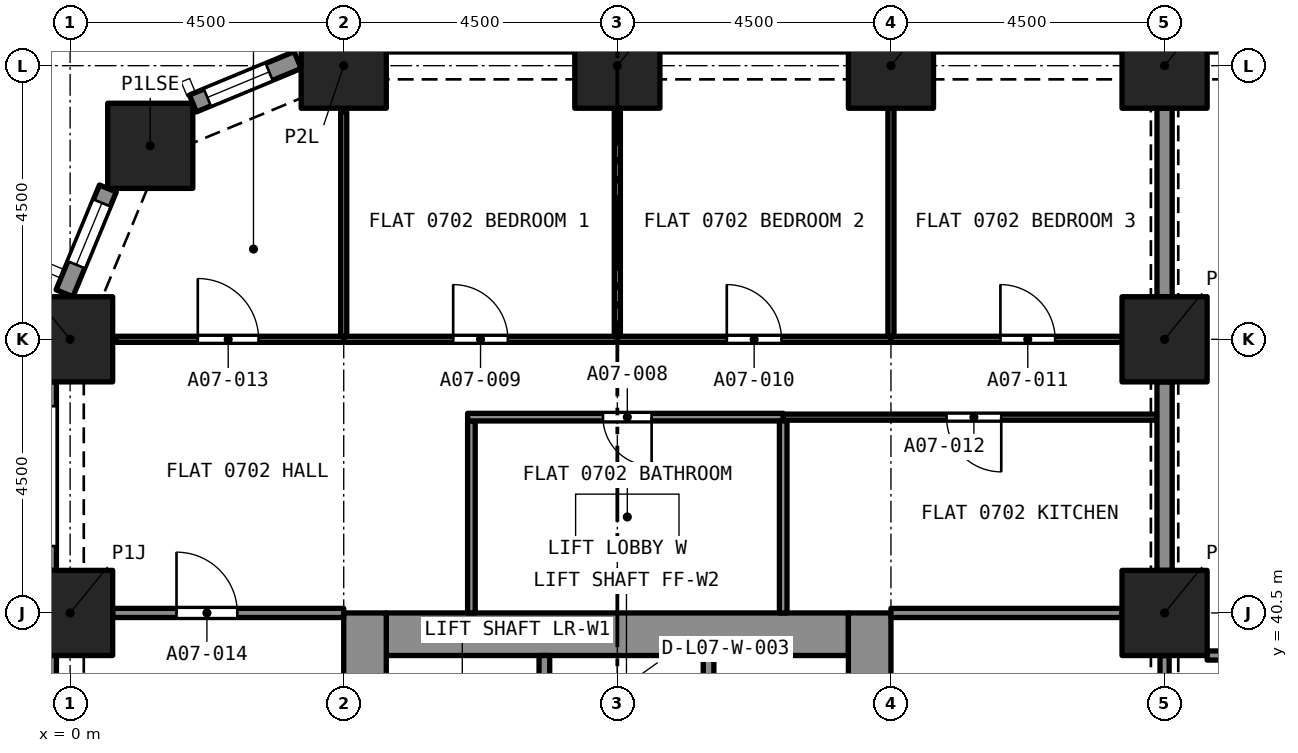
"""IFC4 building model, lengths in metres.
Left out: names, types, materials, properties, quantities, classifications, styles, units other than length and angle.
Written with IfcOpenShell. Run it as: python <this file> out.ifc"""

import sys

from ifc_helpers import new_model, si_unit, direction, frame, frame_2d, origin, origin_2d, place, context, subcontext, project, spatial, rectangle, extrude, element, fill, save


model = new_model("IFC4")
c1 = context("Model", 3, precision=1e-05, world=origin(), true_north=direction((0.0, 1.0)))
c2 = subcontext(c1, "Body", "Model", "MODEL_VIEW")
j1 = project(units=[si_unit("LENGTHUNIT", "METRE"), si_unit("PLANEANGLEUNIT", "RADIAN")], contexts=[c1])
p1 = place(None, origin())
s1 = spatial("IfcSite", under=j1, at=p1, CompositionType="ELEMENT")
p2 = place(p1, origin())
s2 = spatial("IfcBuilding", under=s1, at=p2, CompositionType="ELEMENT")
p3 = place(p2, frame((0.0, 0.0, 33.6)))
s3 = spatial("IfcBuildingStorey", under=s2, at=p3, CompositionType="ELEMENT", Elevation=33.6)
for number, where, z_axis, x_axis in (
    (1, (0.0, 40.5, 0.0), (0.0, 0.0, 1.0), (1.0, 0.0, 0.0)),
    (2, (18.0, 40.5, 0.0), (0.0, 0.0, 1.0), (1.0, 0.0, 0.0)),
    (3, (0.0, 45.0, 0.0), (0.0, 0.0, 1.0), (1.0, 0.0, 0.0)),
    (4, (18.0, 45.0, 0.0), (0.0, 0.0, 1.0), (1.0, 0.0, 0.0)),
    (5, (1.318, 48.182, 0.0), (0.0, 0.0, 1.0), (1.0, 0.0, 0.0)),
    (6, (4.5, 49.5, 0.0), (0.0, 0.0, 1.0), (1.0, 0.0, 0.0)),
    (7, (9.0, 49.5, 0.0), (0.0, 0.0, 1.0), (1.0, 0.0, 0.0)),
    (8, (13.5, 49.5, 0.0), (0.0, 0.0, 1.0), (1.0, 0.0, 0.0)),
    (9, (18.0, 49.5, 0.0), (0.0, 0.0, 1.0), (1.0, 0.0, 0.0)),
):
    element("IfcColumn", number, at=place(p3, frame(where, z_axis=z_axis, x_axis=x_axis)), inside=s3, PredefinedType="COLUMN", context=c2, shape_type="SweptSolid", body=[
        extrude(rectangle(XDim=1.4, YDim=1.4, at=origin_2d()), origin(), (0.0, 0.0, 1.0), 3.2),
    ])
p4 = place(p3, frame((5.2, 40.15, 0.0), z_axis=(0.0, 0.0, 1.0), x_axis=(1.0, 0.0, 0.0)))
e10 = element("IfcWall", 10, at=p4, inside=s3, PredefinedType="SOLIDWALL", context=c2, shape_type="SweptSolid", body=[
    extrude(rectangle(XDim=7.6, YDim=0.7, at=frame_2d((3.8, 0.0))), origin(), (0.0, 0.0, 1.0), 3.2),
])
p5 = place(p3, frame((4.85, 27.0, 0.0), z_axis=(0.0, 0.0, 1.0), x_axis=(0.0, 1.0, 0.0)))
e11 = element("IfcWall", 11, at=p5, inside=s3, PredefinedType="SOLIDWALL", context=c2, shape_type="SweptSolid", body=[
    extrude(rectangle(XDim=13.5, YDim=0.7, at=frame_2d((6.75, 0.0))), origin(), (0.0, 0.0, 1.0), 3.2),
])
p6 = place(p5, frame((8.95, 0.0, 0.0)))
e12 = element("IfcOpeningElement", 12, at=p6, cuts=e11, PredefinedType="OPENING", context=c2, shape_type="SweptSolid", body=[
    extrude(rectangle(XDim=1.2, YDim=2.1, at=frame_2d((0.6, 1.05))), frame((0.0, 0.36, 0.0), z_axis=(0.0, -1.0, 0.0), x_axis=(1.0, 0.0, 0.0)), (0.0, 0.0, 1.0), 0.72),
])
p7 = place(p3, frame((13.15, 27.0, 0.0), z_axis=(0.0, 0.0, 1.0), x_axis=(0.0, 1.0, 0.0)))
e13 = element("IfcWall", 13, at=p7, inside=s3, PredefinedType="SOLIDWALL", context=c2, shape_type="SweptSolid", body=[
    extrude(rectangle(XDim=13.5, YDim=0.7, at=frame_2d((6.75, 0.0))), origin(), (0.0, 0.0, 1.0), 3.2),
])
p8 = place(p7, frame((11.1, 0.0, 0.0)))
e14 = element("IfcOpeningElement", 14, at=p8, cuts=e13, PredefinedType="OPENING", context=c2, shape_type="SweptSolid", body=[
    extrude(rectangle(XDim=1.1, YDim=2.1, at=frame_2d((0.55, 1.05))), frame((0.0, 0.36, 0.0), z_axis=(0.0, -1.0, 0.0), x_axis=(1.0, 0.0, 0.0)), (0.0, 0.0, 1.0), 0.72),
])
p9 = place(p7, frame((8.95, 0.0, 0.0)))
e15 = element("IfcOpeningElement", 15, at=p9, cuts=e13, PredefinedType="OPENING", context=c2, shape_type="SweptSolid", body=[
    extrude(rectangle(XDim=1.2, YDim=2.1, at=frame_2d((0.6, 1.05))), frame((0.0, 0.36, 0.0), z_axis=(0.0, -1.0, 0.0), x_axis=(1.0, 0.0, 0.0)), (0.0, 0.0, 1.0), 0.72),
])
p10 = place(p3, frame((2.02, 48.878, 0.0), z_axis=(0.0, 0.0, 1.0), x_axis=(0.923903565336, 0.38262540684, 0.0)))
e16 = element("IfcWall", 16, at=p10, inside=s3, PredefinedType="SOLIDWALL", context=c2, shape_type="SweptSolid", body=[
    extrude(rectangle(XDim=1.865, YDim=0.3, at=frame_2d((0.933, 0.0))), origin(), (0.0, 0.0, 1.0), 3.2),
])
p11 = place(p10, frame((0.258, 0.0, 0.45)))
e17 = element("IfcOpeningElement", 17, at=p11, cuts=e16, PredefinedType="OPENING", context=c2, shape_type="SweptSolid", body=[
    extrude(rectangle(XDim=1.1, YDim=1.95, at=frame_2d((0.55, 0.975))), frame((0.0, 0.16, 0.0), z_axis=(0.0, -1.0, 0.0), x_axis=(1.0, 0.0, 0.0)), (0.0, 0.0, 1.0), 0.32),
])
p12 = place(p3, frame((-0.092, 45.757, 0.0), z_axis=(0.0, 0.0, 1.0), x_axis=(0.382737135771, 0.923857286003, 0.0)))
e18 = element("IfcWall", 18, at=p12, inside=s3, PredefinedType="SOLIDWALL", context=c2, shape_type="SweptSolid", body=[
    extrude(rectangle(XDim=1.865, YDim=0.3, at=frame_2d((0.933, 0.0))), origin(), (0.0, 0.0, 1.0), 3.2),
])
p13 = place(p12, frame((0.508, 0.0, 0.45)))
e19 = element("IfcOpeningElement", 19, at=p13, cuts=e18, PredefinedType="OPENING", context=c2, shape_type="SweptSolid", body=[
    extrude(rectangle(XDim=1.1, YDim=1.95, at=frame_2d((0.55, 0.975))), frame((0.0, 0.16, 0.0), z_axis=(0.0, -1.0, 0.0), x_axis=(1.0, 0.0, 0.0)), (0.0, 0.0, 1.0), 0.32),
])
p14 = place(p3, frame((-0.375, 41.2, 0.0), z_axis=(0.0, 0.0, 1.0), x_axis=(0.0, 1.0, 0.0)))
e20 = element("IfcWall", 20, at=p14, inside=s3, PredefinedType="SOLIDWALL", context=c2, shape_type="SweptSolid", body=[
    extrude(rectangle(XDim=3.1, YDim=0.3, at=frame_2d((1.55, 0.0))), origin(), (0.0, 0.0, 1.0), 3.2),
])
p15 = place(p14, frame((0.4, 0.0, 0.45)))
e21 = element("IfcOpeningElement", 21, at=p15, cuts=e20, PredefinedType="OPENING", context=c2, shape_type="SweptSolid", body=[
    extrude(rectangle(XDim=2.3, YDim=1.95, at=frame_2d((1.15, 0.975))), frame((0.0, 0.16, 0.0), z_axis=(0.0, -1.0, 0.0), x_axis=(1.0, 0.0, 0.0)), (0.0, 0.0, 1.0), 0.32),
])
p16 = place(p3, frame((-0.375, 36.7, 0.0), z_axis=(0.0, 0.0, 1.0), x_axis=(0.0, 1.0, 0.0)))
e22 = element("IfcWall", 22, at=p16, inside=s3, PredefinedType="SOLIDWALL", context=c2, shape_type="SweptSolid", body=[
    extrude(rectangle(XDim=3.1, YDim=0.3, at=frame_2d((1.55, 0.0))), origin(), (0.0, 0.0, 1.0), 3.2),
])
p17 = place(p16, frame((0.4, 0.0, 0.45)))
e23 = element("IfcOpeningElement", 23, at=p17, cuts=e22, PredefinedType="OPENING", context=c2, shape_type="SweptSolid", body=[
    extrude(rectangle(XDim=2.3, YDim=1.95, at=frame_2d((1.15, 0.975))), frame((0.0, 0.16, 0.0), z_axis=(0.0, -1.0, 0.0), x_axis=(1.0, 0.0, 0.0)), (0.0, 0.0, 1.0), 0.32),
])
p18 = place(p3, frame((6.6, 40.5, 0.0), z_axis=(0.0, 0.0, 1.0), x_axis=(0.0, 1.0, 0.0)))
e24 = element("IfcWall", 24, at=p18, inside=s3, PredefinedType="PARTITIONING", context=c2, shape_type="SweptSolid", body=[
    extrude(rectangle(XDim=3.157, YDim=0.125, at=frame_2d((1.579, 0.0))), origin(), (0.0, 0.0, 1.0), 2.9),
])
p19 = place(p3, frame((11.728, 43.72, 0.0), z_axis=(0.0, 0.0, 1.0), x_axis=(-1.0, 0.0, 0.0)))
e25 = element("IfcWall", 25, at=p19, inside=s3, PredefinedType="PARTITIONING", context=c2, shape_type="SweptSolid", body=[
    extrude(rectangle(XDim=5.19, YDim=0.125, at=frame_2d((2.595, 0.0))), origin(), (0.0, 0.0, 1.0), 2.9),
])
p20 = place(p19, frame((2.164, 0.0, 0.0)))
e26 = element("IfcOpeningElement", 26, at=p20, cuts=e25, PredefinedType="OPENING", context=c2, shape_type="SweptSolid", body=[
    extrude(rectangle(XDim=0.8, YDim=2.1, at=frame_2d((0.4, 1.05))), frame((0.0, 0.073, 0.0), z_axis=(0.0, -1.0, 0.0), x_axis=(1.0, 0.0, 0.0)), (0.0, 0.0, 1.0), 0.145),
])
p21 = place(p3, frame((11.728, 40.5, 0.0), z_axis=(0.0, 0.0, 1.0), x_axis=(0.0, 1.0, 0.0)))
e27 = element("IfcWall", 27, at=p21, inside=s3, PredefinedType="PARTITIONING", context=c2, shape_type="SweptSolid", body=[
    extrude(rectangle(XDim=3.157, YDim=0.125, at=frame_2d((1.579, 0.0))), origin(), (0.0, 0.0, 1.0), 2.9),
])
p22 = place(p3, frame((9.0, 45.05, 0.0), z_axis=(0.0, 0.0, 1.0), x_axis=(0.0, 1.0, 0.0)))
e28 = element("IfcWall", 28, at=p22, inside=s3, PredefinedType="PARTITIONING", context=c2, shape_type="SweptSolid", body=[
    extrude(rectangle(XDim=3.75, YDim=0.1, at=frame_2d((1.875, 0.0))), origin(), (0.0, 0.0, 1.0), 2.9),
])
p23 = place(p3, frame((4.5, 45.0, 0.0), z_axis=(0.0, 0.0, 1.0), x_axis=(1.0, 0.0, 0.0)))
e29 = element("IfcWall", 29, at=p23, inside=s3, PredefinedType="PARTITIONING", context=c2, shape_type="SweptSolid", body=[
    extrude(rectangle(XDim=4.5, YDim=0.1, at=frame_2d((2.25, 0.0))), origin(), (0.0, 0.0, 1.0), 2.9),
])
p24 = place(p23, frame((1.8, 0.0, 0.0)))
e30 = element("IfcOpeningElement", 30, at=p24, cuts=e29, PredefinedType="OPENING", context=c2, shape_type="SweptSolid", body=[
    extrude(rectangle(XDim=0.9, YDim=2.1, at=frame_2d((0.45, 1.05))), frame((0.0, 0.06, 0.0), z_axis=(0.0, -1.0, 0.0), x_axis=(1.0, 0.0, 0.0)), (0.0, 0.0, 1.0), 0.12),
])
p25 = place(p3, frame((4.5, 45.05, 0.0), z_axis=(0.0, 0.0, 1.0), x_axis=(0.0, 1.0, 0.0)))
e31 = element("IfcWall", 31, at=p25, inside=s3, PredefinedType="PARTITIONING", context=c2, shape_type="SweptSolid", body=[
    extrude(rectangle(XDim=3.692, YDim=0.1, at=frame_2d((1.846, 0.0))), origin(), (0.0, 0.0, 1.0), 2.9),
])
p26 = place(p3, frame((13.5, 45.05, 0.0), z_axis=(0.0, 0.0, 1.0), x_axis=(0.0, 1.0, 0.0)))
e32 = element("IfcWall", 32, at=p26, inside=s3, PredefinedType="PARTITIONING", context=c2, shape_type="SweptSolid", body=[
    extrude(rectangle(XDim=3.75, YDim=0.1, at=frame_2d((1.875, 0.0))), origin(), (0.0, 0.0, 1.0), 2.9),
])
p27 = place(p3, frame((9.0, 45.0, 0.0), z_axis=(0.0, 0.0, 1.0), x_axis=(1.0, 0.0, 0.0)))
e33 = element("IfcWall", 33, at=p27, inside=s3, PredefinedType="PARTITIONING", context=c2, shape_type="SweptSolid", body=[
    extrude(rectangle(XDim=4.5, YDim=0.1, at=frame_2d((2.25, 0.0))), origin(), (0.0, 0.0, 1.0), 2.9),
])
p28 = place(p27, frame((1.8, 0.0, 0.0)))
e34 = element("IfcOpeningElement", 34, at=p28, cuts=e33, PredefinedType="OPENING", context=c2, shape_type="SweptSolid", body=[
    extrude(rectangle(XDim=0.9, YDim=2.1, at=frame_2d((0.45, 1.05))), frame((0.0, 0.06, 0.0), z_axis=(0.0, -1.0, 0.0), x_axis=(1.0, 0.0, 0.0)), (0.0, 0.0, 1.0), 0.12),
])
p29 = place(p3, frame((13.5, 45.0, 0.0), z_axis=(0.0, 0.0, 1.0), x_axis=(1.0, 0.0, 0.0)))
e35 = element("IfcWall", 35, at=p29, inside=s3, PredefinedType="PARTITIONING", context=c2, shape_type="SweptSolid", body=[
    extrude(rectangle(XDim=3.8, YDim=0.1, at=frame_2d((1.9, 0.0))), origin(), (0.0, 0.0, 1.0), 2.9),
])
p30 = place(p29, frame((1.8, 0.0, 0.0)))
e36 = element("IfcOpeningElement", 36, at=p30, cuts=e35, PredefinedType="OPENING", context=c2, shape_type="SweptSolid", body=[
    extrude(rectangle(XDim=0.9, YDim=2.1, at=frame_2d((0.45, 1.05))), frame((0.0, 0.06, 0.0), z_axis=(0.0, -1.0, 0.0), x_axis=(1.0, 0.0, 0.0)), (0.0, 0.0, 1.0), 0.12),
])
p31 = place(p3, frame((18.0, 45.7, 0.0), z_axis=(0.0, 0.0, 1.0), x_axis=(0.0, 1.0, 0.0)))
e37 = element("IfcWall", 37, at=p31, inside=s3, PredefinedType="PARTITIONING", context=c2, shape_type="SweptSolid", body=[
    extrude(rectangle(XDim=3.1, YDim=0.25, at=frame_2d((1.55, 0.0))), origin(), (0.0, 0.0, 1.0), 2.38),
])
p32 = place(p3, frame((17.875, 43.72, 0.0), z_axis=(0.0, 0.0, 1.0), x_axis=(-1.0, 0.0, 0.0)))
e38 = element("IfcWall", 38, at=p32, inside=s3, PredefinedType="PARTITIONING", context=c2, shape_type="SweptSolid", body=[
    extrude(rectangle(XDim=6.147, YDim=0.1, at=frame_2d((3.073, 0.0))), origin(), (0.0, 0.0, 1.0), 2.9),
])
p33 = place(p32, frame((2.561, 0.0, 0.0)))
e39 = element("IfcOpeningElement", 39, at=p33, cuts=e38, PredefinedType="OPENING", context=c2, shape_type="SweptSolid", body=[
    extrude(rectangle(XDim=0.9, YDim=2.1, at=frame_2d((0.45, 1.05))), frame((0.0, 0.06, 0.0), z_axis=(0.0, -1.0, 0.0), x_axis=(1.0, 0.0, 0.0)), (0.0, 0.0, 1.0), 0.12),
])
p34 = place(p3, frame((0.758, 45.0, 0.0), z_axis=(0.0, 0.0, 1.0), x_axis=(1.0, 0.0, 0.0)))
e40 = element("IfcWall", 40, at=p34, inside=s3, PredefinedType="PARTITIONING", context=c2, shape_type="SweptSolid", body=[
    extrude(rectangle(XDim=3.742, YDim=0.1, at=frame_2d((1.871, 0.0))), origin(), (0.0, 0.0, 1.0), 2.9),
])
p35 = place(p34, frame((1.342, 0.0, 0.0)))
e41 = element("IfcOpeningElement", 41, at=p35, cuts=e40, PredefinedType="OPENING", context=c2, shape_type="SweptSolid", body=[
    extrude(rectangle(XDim=1.0, YDim=2.1, at=frame_2d((0.5, 1.05))), frame((0.0, 0.06, 0.0), z_axis=(0.0, -1.0, 0.0), x_axis=(1.0, 0.0, 0.0)), (0.0, 0.0, 1.0), 0.12),
])
p36 = place(p3, frame((0.7, 40.5, 0.0), z_axis=(0.0, 0.0, 1.0), x_axis=(1.0, 0.0, 0.0)))
e42 = element("IfcWall", 42, at=p36, inside=s3, PredefinedType="PARTITIONING", context=c2, shape_type="SweptSolid", body=[
    extrude(rectangle(XDim=3.8, YDim=0.15, at=frame_2d((1.9, 0.0))), origin(), (0.0, 0.0, 1.0), 2.9),
])
p37 = place(p36, frame((1.05, 0.0, 0.0)))
e43 = element("IfcOpeningElement", 43, at=p37, cuts=e42, PredefinedType="OPENING", context=c2, shape_type="SweptSolid", body=[
    extrude(rectangle(XDim=1.0, YDim=2.1, at=frame_2d((0.5, 1.05))), frame((0.0, 0.085, 0.0), z_axis=(0.0, -1.0, 0.0), x_axis=(1.0, 0.0, 0.0)), (0.0, 0.0, 1.0), 0.17),
])
p38 = place(p3, frame((18.0, 41.2, 0.0), z_axis=(0.0, 0.0, 1.0), x_axis=(0.0, 1.0, 0.0)))
e44 = element("IfcWall", 44, at=p38, inside=s3, PredefinedType="PARTITIONING", context=c2, shape_type="SweptSolid", body=[
    extrude(rectangle(XDim=3.1, YDim=0.25, at=frame_2d((1.55, 0.0))), origin(), (0.0, 0.0, 1.0), 2.38),
])
p39 = place(p3, frame((13.5, 40.5, 0.0), z_axis=(0.0, 0.0, 1.0), x_axis=(1.0, 0.0, 0.0)))
e45 = element("IfcWall", 45, at=p39, inside=s3, PredefinedType="PARTITIONING", context=c2, shape_type="SweptSolid", body=[
    extrude(rectangle(XDim=3.8, YDim=0.15, at=frame_2d((1.9, 0.0))), origin(), (0.0, 0.0, 1.0), 2.9),
])
p40 = place(p3, frame((18.7, 39.8, 0.0), z_axis=(0.0, 0.0, 1.0), x_axis=(1.0, 0.0, 0.0)))
e46 = element("IfcWall", 46, at=p40, inside=s3, PredefinedType="PARTITIONING", context=c2, shape_type="SweptSolid", body=[
    extrude(rectangle(XDim=12.1, YDim=0.15, at=frame_2d((6.05, 0.0))), origin(), (0.0, 0.0, 1.0), 2.75),
])
p41 = place(p40, frame((5.55, 0.0, 0.0)))
e47 = element("IfcOpeningElement", 47, at=p41, cuts=e46, PredefinedType="OPENING", context=c2, shape_type="SweptSolid", body=[
    extrude(rectangle(XDim=1.0, YDim=2.1, at=frame_2d((0.5, 1.05))), frame((0.0, 0.085, 0.0), z_axis=(0.0, -1.0, 0.0), x_axis=(1.0, 0.0, 0.0)), (0.0, 0.0, 1.0), 0.17),
])
p42 = place(p3, frame((18.0, 39.8, 0.0), z_axis=(0.0, 0.0, 1.0), x_axis=(0.0, -1.0, 0.0)))
e48 = element("IfcWall", 48, at=p42, inside=s3, PredefinedType="PARTITIONING", context=c2, shape_type="SweptSolid", body=[
    extrude(rectangle(XDim=3.1, YDim=0.15, at=frame_2d((1.55, 0.0))), origin(), (0.0, 0.0, 1.0), 2.38),
])
p43 = place(p42, frame((0.95, 0.0, 0.0)))
e49 = element("IfcOpeningElement", 49, at=p43, cuts=e48, PredefinedType="OPENING", context=c2, shape_type="SweptSolid", body=[
    extrude(rectangle(XDim=1.2, YDim=2.1, at=frame_2d((0.6, 1.05))), frame((0.0, 0.085, 0.0), z_axis=(0.0, -1.0, 0.0), x_axis=(1.0, 0.0, 0.0)), (0.0, 0.0, 1.0), 0.17),
])
p44 = place(p3, frame((7.8, 37.5, 0.0), z_axis=(0.0, 0.0, 1.0), x_axis=(0.0, 1.0, 0.0)))
e50 = element("IfcWall", 50, at=p44, inside=s3, PredefinedType="SOLIDWALL", context=c2, shape_type="SweptSolid", body=[
    extrude(rectangle(XDim=2.3, YDim=0.175, at=frame_2d((1.15, 0.0))), origin(), (0.0, 0.0, 1.0), 2.9),
])
p45 = place(p3, frame((10.5, 37.5, 0.0), z_axis=(0.0, 0.0, 1.0), x_axis=(0.0, 1.0, 0.0)))
e51 = element("IfcWall", 51, at=p45, inside=s3, PredefinedType="SOLIDWALL", context=c2, shape_type="SweptSolid", body=[
    extrude(rectangle(XDim=2.3, YDim=0.175, at=frame_2d((1.15, 0.0))), origin(), (0.0, 0.0, 1.0), 2.9),
])
p46 = place(p45, frame((0.65, 0.0, 0.0)))
e52 = element("IfcOpeningElement", 52, at=p46, cuts=e51, PredefinedType="OPENING", context=c2, shape_type="SweptSolid", body=[
    extrude(rectangle(XDim=1.0, YDim=2.1, at=frame_2d((0.5, 1.05))), frame((0.0, 0.097, 0.0), z_axis=(0.0, -1.0, 0.0), x_axis=(1.0, 0.0, 0.0)), (0.0, 0.0, 1.0), 0.195),
])
p47 = place(p11, origin())
e53 = element("IfcWindow", 53, at=p47, inside=s3, PartitioningType="SINGLE_PANEL", PredefinedType="WINDOW", context=c2, shape_type="SweptSolid", body=[
    extrude(rectangle(XDim=1.1, YDim=1.95, at=frame_2d((0.55, 0.975))), frame((0.0, 0.03, 0.0), z_axis=(0.0, -1.0, 0.0), x_axis=(1.0, 0.0, 0.0)), (0.0, 0.0, 1.0), 0.06),
])
fill(e17, e53)
p48 = place(p13, origin())
e54 = element("IfcWindow", 54, at=p48, inside=s3, PartitioningType="SINGLE_PANEL", PredefinedType="WINDOW", context=c2, shape_type="SweptSolid", body=[
    extrude(rectangle(XDim=1.1, YDim=1.95, at=frame_2d((0.55, 0.975))), frame((0.0, 0.03, 0.0), z_axis=(0.0, -1.0, 0.0), x_axis=(1.0, 0.0, 0.0)), (0.0, 0.0, 1.0), 0.06),
])
fill(e19, e54)
p49 = place(p20, origin())
e55 = element("IfcDoor", 55, at=p49, inside=s3, OperationType="SINGLE_SWING_LEFT", PredefinedType="DOOR", context=c2, shape_type="SweptSolid", body=[
    extrude(rectangle(XDim=0.8, YDim=2.1, at=frame_2d((0.4, 1.05))), frame((0.0, 0.025, 0.0), z_axis=(0.0, -1.0, 0.0), x_axis=(1.0, 0.0, 0.0)), (0.0, 0.0, 1.0), 0.05),
])
fill(e26, e55)
p50 = place(p24, origin())
e56 = element("IfcDoor", 56, at=p50, inside=s3, OperationType="SINGLE_SWING_RIGHT", PredefinedType="DOOR", context=c2, shape_type="SweptSolid", body=[
    extrude(rectangle(XDim=0.9, YDim=2.1, at=frame_2d((0.45, 1.05))), frame((0.0, 0.025, 0.0), z_axis=(0.0, -1.0, 0.0), x_axis=(1.0, 0.0, 0.0)), (0.0, 0.0, 1.0), 0.05),
])
fill(e30, e56)
p51 = place(p28, origin())
e57 = element("IfcDoor", 57, at=p51, inside=s3, OperationType="SINGLE_SWING_LEFT", PredefinedType="DOOR", context=c2, shape_type="SweptSolid", body=[
    extrude(rectangle(XDim=0.9, YDim=2.1, at=frame_2d((0.45, 1.05))), frame((0.0, 0.025, 0.0), z_axis=(0.0, -1.0, 0.0), x_axis=(1.0, 0.0, 0.0)), (0.0, 0.0, 1.0), 0.05),
])
fill(e34, e57)
p52 = place(p30, origin())
e58 = element("IfcDoor", 58, at=p52, inside=s3, OperationType="SINGLE_SWING_RIGHT", PredefinedType="DOOR", context=c2, shape_type="SweptSolid", body=[
    extrude(rectangle(XDim=0.9, YDim=2.1, at=frame_2d((0.45, 1.05))), frame((0.0, 0.025, 0.0), z_axis=(0.0, -1.0, 0.0), x_axis=(1.0, 0.0, 0.0)), (0.0, 0.0, 1.0), 0.05),
])
fill(e36, e58)
p53 = place(p33, origin())
e59 = element("IfcDoor", 59, at=p53, inside=s3, OperationType="SINGLE_SWING_LEFT", PredefinedType="DOOR", context=c2, shape_type="SweptSolid", body=[
    extrude(rectangle(XDim=0.9, YDim=2.1, at=frame_2d((0.45, 1.05))), frame((0.0, 0.025, 0.0), z_axis=(0.0, -1.0, 0.0), x_axis=(1.0, 0.0, 0.0)), (0.0, 0.0, 1.0), 0.05),
])
fill(e39, e59)
p54 = place(p35, origin())
e60 = element("IfcDoor", 60, at=p54, inside=s3, OperationType="SINGLE_SWING_LEFT", PredefinedType="DOOR", context=c2, shape_type="SweptSolid", body=[
    extrude(rectangle(XDim=1.0, YDim=2.1, at=frame_2d((0.5, 1.05))), frame((0.0, 0.025, 0.0), z_axis=(0.0, -1.0, 0.0), x_axis=(1.0, 0.0, 0.0)), (0.0, 0.0, 1.0), 0.05),
])
fill(e41, e60)
p55 = place(p37, origin())
e61 = element("IfcDoor", 61, at=p55, inside=s3, OperationType="SINGLE_SWING_LEFT", PredefinedType="DOOR", context=c2, shape_type="SweptSolid", body=[
    extrude(rectangle(XDim=1.0, YDim=2.1, at=frame_2d((0.5, 1.05))), frame((0.0, 0.025, 0.0), z_axis=(0.0, -1.0, 0.0), x_axis=(1.0, 0.0, 0.0)), (0.0, 0.0, 1.0), 0.05),
])
fill(e43, e61)
save(model, sys.argv[1])
